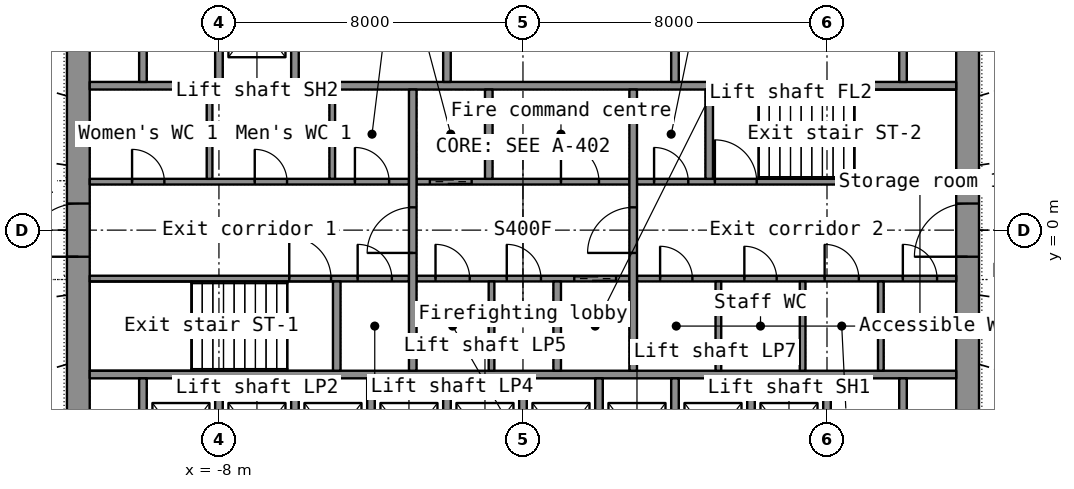
"""IFC4 building model, lengths in metres.
Left out: names, types, materials, properties, quantities, classifications, styles, units other than length and angle.
Written with IfcOpenShell. Run it as: python <this file> out.ifc"""

import sys

from ifc_helpers import new_model, si_unit, direction, frame, frame_2d, origin, place, context, subcontext, project, spatial, rectangle, extrude, element, fill, save


model = new_model("IFC4")
c1 = context("Model", 3, precision=1e-05, world=origin(), true_north=direction((0.0, 1.0)))
c2 = subcontext(c1, "Body", "Model", "MODEL_VIEW")
j1 = project(units=[si_unit("LENGTHUNIT", "METRE"), si_unit("PLANEANGLEUNIT", "RADIAN")], contexts=[c1])
p1 = place(None, origin())
s1 = spatial("IfcSite", under=j1, at=p1, CompositionType="ELEMENT")
p2 = place(p1, origin())
s2 = spatial("IfcBuilding", under=s1, at=p2, CompositionType="ELEMENT")
p3 = place(p2, origin())
s3 = spatial("IfcBuildingStorey", under=s2, at=p3, CompositionType="ELEMENT", Elevation=0.0)
p4 = place(p3, frame((-11.7, -7.2, 0.0), z_axis=(0.0, 0.0, 1.0), x_axis=(0.0, 1.0, 0.0)))
e1 = element("IfcWall", 1, at=p4, inside=s3, PredefinedType="SHEAR", context=c2, shape_type="SweptSolid", body=[
    extrude(rectangle(XDim=14.4, YDim=0.6, at=frame_2d((7.2, 0.0))), origin(), (0.0, 0.0, 1.0), 6.6),
])
p5 = place(p4, frame((6.5, 0.0, 0.0)))
e2 = element("IfcOpeningElement", 2, at=p5, cuts=e1, PredefinedType="OPENING", context=c2, shape_type="SweptSolid", body=[
    extrude(rectangle(XDim=1.4, YDim=2.2, at=frame_2d((0.7, 1.1))), frame((0.0, 0.31, 0.0), z_axis=(0.0, -1.0, 0.0), x_axis=(1.0, 0.0, 0.0)), (0.0, 0.0, 1.0), 0.62),
])
p6 = place(p3, frame((11.7, -7.2, 0.0), z_axis=(0.0, 0.0, 1.0), x_axis=(0.0, 1.0, 0.0)))
e3 = element("IfcWall", 3, at=p6, inside=s3, PredefinedType="SHEAR", context=c2, shape_type="SweptSolid", body=[
    extrude(rectangle(XDim=14.4, YDim=0.6, at=frame_2d((7.2, 0.0))), origin(), (0.0, 0.0, 1.0), 6.6),
])
p7 = place(p6, frame((6.5, 0.0, 0.0)))
e4 = element("IfcOpeningElement", 4, at=p7, cuts=e3, PredefinedType="OPENING", context=c2, shape_type="SweptSolid", body=[
    extrude(rectangle(XDim=1.4, YDim=2.2, at=frame_2d((0.7, 1.1))), frame((0.0, 0.31, 0.0), z_axis=(0.0, -1.0, 0.0), x_axis=(1.0, 0.0, 0.0)), (0.0, 0.0, 1.0), 0.62),
])
for number, where, z_axis, x_axis in (
    (5, (-11.4, -3.8, 0.0), (0.0, 0.0, 1.0), (1.0, 0.0, 0.0)),
    (6, (-11.4, 3.8, 0.0), (0.0, 0.0, 1.0), (1.0, 0.0, 0.0)),
):
    element("IfcWall", number, at=place(p3, frame(where, z_axis=z_axis, x_axis=x_axis)), inside=s3, PredefinedType="SHEAR", context=c2, shape_type="SweptSolid", body=[
        extrude(rectangle(XDim=22.8, YDim=0.2, at=frame_2d((11.4, 0.0))), origin(), (0.0, 0.0, 1.0), 6.6),
    ])
for number, where, z_axis, x_axis in (
    (7, (-10.0, -6.6, 0.0), (0.0, 0.0, 1.0), (0.0, 1.0, 0.0)),
    (8, (-8.0, -6.6, 0.0), (0.0, 0.0, 1.0), (0.0, 1.0, 0.0)),
    (9, (-6.0, -6.6, 0.0), (0.0, 0.0, 1.0), (0.0, 1.0, 0.0)),
    (10, (-4.0, -6.6, 0.0), (0.0, 0.0, 1.0), (0.0, 1.0, 0.0)),
    (11, (-2.0, -6.6, 0.0), (0.0, 0.0, 1.0), (0.0, 1.0, 0.0)),
    (12, (0.0, -6.6, 0.0), (0.0, 0.0, 1.0), (0.0, 1.0, 0.0)),
    (13, (2.0, -6.6, 0.0), (0.0, 0.0, 1.0), (0.0, 1.0, 0.0)),
    (14, (4.0, -6.6, 0.0), (0.0, 0.0, 1.0), (0.0, 1.0, 0.0)),
    (15, (6.0, -6.6, 0.0), (0.0, 0.0, 1.0), (0.0, 1.0, 0.0)),
    (16, (8.0, -6.6, 0.0), (0.0, 0.0, 1.0), (0.0, 1.0, 0.0)),
    (17, (10.0, -6.6, 0.0), (0.0, 0.0, 1.0), (0.0, 1.0, 0.0)),
    (18, (-10.0, 3.9, 0.0), (0.0, 0.0, 1.0), (0.0, 1.0, 0.0)),
    (19, (-8.0, 3.9, 0.0), (0.0, 0.0, 1.0), (0.0, 1.0, 0.0)),
    (20, (-6.0, 3.9, 0.0), (0.0, 0.0, 1.0), (0.0, 1.0, 0.0)),
    (21, (10.0, 3.9, 0.0), (0.0, 0.0, 1.0), (0.0, 1.0, 0.0)),
):
    element("IfcWall", number, at=place(p3, frame(where, z_axis=z_axis, x_axis=x_axis)), inside=s3, PredefinedType="SHEAR", context=c2, shape_type="SweptSolid", body=[
        extrude(rectangle(XDim=2.7, YDim=0.2, at=frame_2d((1.35, 0.0))), origin(), (0.0, 0.0, 1.0), 6.6),
    ])
for number, where, z_axis, x_axis in (
    (22, (-2.0, 3.9, 0.0), (0.0, 0.0, 1.0), (0.0, 1.0, 0.0)),
    (23, (4.0, 3.9, 0.0), (0.0, 0.0, 1.0), (0.0, 1.0, 0.0)),
):
    element("IfcWall", number, at=place(p3, frame(where, z_axis=z_axis, x_axis=x_axis)), inside=s3, PredefinedType="PARTITIONING", context=c2, shape_type="SweptSolid", body=[
        extrude(rectangle(XDim=2.7, YDim=0.2, at=frame_2d((1.35, 0.0))), origin(), (0.0, 0.0, 1.0), 6.6),
    ])
p8 = place(p3, frame((-11.4, -1.275, 0.0), z_axis=(0.0, 0.0, 1.0), x_axis=(1.0, 0.0, 0.0)))
e24 = element("IfcWall", 24, at=p8, inside=s3, PredefinedType="SHEAR", context=c2, shape_type="SweptSolid", body=[
    extrude(rectangle(XDim=8.4, YDim=0.15, at=frame_2d((4.2, 0.0))), origin(), (0.0, 0.0, 1.0), 6.6),
])
p9 = place(p8, frame((5.25, 0.0, 0.0)))
e25 = element("IfcOpeningElement", 25, at=p9, cuts=e24, PredefinedType="OPENING", context=c2, shape_type="SweptSolid", body=[
    extrude(rectangle(XDim=1.1, YDim=2.15, at=frame_2d((0.55, 1.075))), frame((0.0, 0.085, 0.0), z_axis=(0.0, -1.0, 0.0), x_axis=(1.0, 0.0, 0.0)), (0.0, 0.0, 1.0), 0.17),
])
p10 = place(p8, frame((7.05, 0.0, 0.0)))
e26 = element("IfcOpeningElement", 26, at=p10, cuts=e24, PredefinedType="OPENING", context=c2, shape_type="SweptSolid", body=[
    extrude(rectangle(XDim=0.9, YDim=2.1, at=frame_2d((0.45, 1.05))), frame((0.0, 0.085, 0.0), z_axis=(0.0, -1.0, 0.0), x_axis=(1.0, 0.0, 0.0)), (0.0, 0.0, 1.0), 0.17),
])
p11 = place(p3, frame((-2.8, -1.275, 0.0), z_axis=(0.0, 0.0, 1.0), x_axis=(1.0, 0.0, 0.0)))
e27 = element("IfcWall", 27, at=p11, inside=s3, PredefinedType="SHEAR", context=c2, shape_type="SweptSolid", body=[
    extrude(rectangle(XDim=5.6, YDim=0.15, at=frame_2d((2.8, 0.0))), origin(), (0.0, 0.0, 1.0), 6.6),
])
p12 = place(p11, frame((4.15, 0.0, 0.0)))
e28 = element("IfcOpeningElement", 28, at=p12, cuts=e27, PredefinedType="OPENING", context=c2, shape_type="SweptSolid", body=[
    extrude(rectangle(XDim=1.1, YDim=2.2, at=frame_2d((0.55, 1.1))), frame((0.0, 0.085, 0.0), z_axis=(0.0, -1.0, 0.0), x_axis=(1.0, 0.0, 0.0)), (0.0, 0.0, 1.0), 0.17),
])
p13 = place(p11, frame((0.499, 0.0, 0.0)))
e29 = element("IfcOpeningElement", 29, at=p13, cuts=e27, PredefinedType="OPENING", context=c2, shape_type="SweptSolid", body=[
    extrude(rectangle(XDim=0.9, YDim=2.1, at=frame_2d((0.45, 1.05))), frame((0.0, 0.085, 0.0), z_axis=(0.0, -1.0, 0.0), x_axis=(1.0, 0.0, 0.0)), (0.0, 0.0, 1.0), 0.17),
])
p14 = place(p11, frame((2.374, 0.0, 0.0)))
e30 = element("IfcOpeningElement", 30, at=p14, cuts=e27, PredefinedType="OPENING", context=c2, shape_type="SweptSolid", body=[
    extrude(rectangle(XDim=0.9, YDim=2.1, at=frame_2d((0.45, 1.05))), frame((0.0, 0.085, 0.0), z_axis=(0.0, -1.0, 0.0), x_axis=(1.0, 0.0, 0.0)), (0.0, 0.0, 1.0), 0.17),
])
p15 = place(p3, frame((3.0, -1.275, 0.0), z_axis=(0.0, 0.0, 1.0), x_axis=(1.0, 0.0, 0.0)))
e31 = element("IfcWall", 31, at=p15, inside=s3, PredefinedType="PARTITIONING", context=c2, shape_type="SweptSolid", body=[
    extrude(rectangle(XDim=8.4, YDim=0.15, at=frame_2d((4.2, 0.0))), origin(), (0.0, 0.0, 1.0), 6.6),
])
p16 = place(p15, frame((0.608, 0.0, 0.0)))
e32 = element("IfcOpeningElement", 32, at=p16, cuts=e31, PredefinedType="OPENING", context=c2, shape_type="SweptSolid", body=[
    extrude(rectangle(XDim=0.85, YDim=2.1, at=frame_2d((0.425, 1.05))), frame((0.0, 0.085, 0.0), z_axis=(0.0, -1.0, 0.0), x_axis=(1.0, 0.0, 0.0)), (0.0, 0.0, 1.0), 0.17),
])
p17 = place(p15, frame((2.825, 0.0, 0.0)))
e33 = element("IfcOpeningElement", 33, at=p17, cuts=e31, PredefinedType="OPENING", context=c2, shape_type="SweptSolid", body=[
    extrude(rectangle(XDim=0.85, YDim=2.1, at=frame_2d((0.425, 1.05))), frame((0.0, 0.085, 0.0), z_axis=(0.0, -1.0, 0.0), x_axis=(1.0, 0.0, 0.0)), (0.0, 0.0, 1.0), 0.17),
])
p18 = place(p15, frame((4.938, 0.0, 0.0)))
e34 = element("IfcOpeningElement", 34, at=p18, cuts=e31, PredefinedType="OPENING", context=c2, shape_type="SweptSolid", body=[
    extrude(rectangle(XDim=0.9, YDim=2.1, at=frame_2d((0.45, 1.05))), frame((0.0, 0.085, 0.0), z_axis=(0.0, -1.0, 0.0), x_axis=(1.0, 0.0, 0.0)), (0.0, 0.0, 1.0), 0.17),
])
p19 = place(p15, frame((6.996, 0.0, 0.0)))
e35 = element("IfcOpeningElement", 35, at=p19, cuts=e31, PredefinedType="OPENING", context=c2, shape_type="SweptSolid", body=[
    extrude(rectangle(XDim=0.9, YDim=2.1, at=frame_2d((0.45, 1.05))), frame((0.0, 0.085, 0.0), z_axis=(0.0, -1.0, 0.0), x_axis=(1.0, 0.0, 0.0)), (0.0, 0.0, 1.0), 0.17),
])
p20 = place(p3, frame((-11.4, 1.275, 0.0), z_axis=(0.0, 0.0, 1.0), x_axis=(1.0, 0.0, 0.0)))
e36 = element("IfcWall", 36, at=p20, inside=s3, PredefinedType="PARTITIONING", context=c2, shape_type="SweptSolid", body=[
    extrude(rectangle(XDim=8.4, YDim=0.15, at=frame_2d((4.2, 0.0))), origin(), (0.0, 0.0, 1.0), 6.6),
])
p21 = place(p20, frame((1.114, 0.0, 0.0)))
e37 = element("IfcOpeningElement", 37, at=p21, cuts=e36, PredefinedType="OPENING", context=c2, shape_type="SweptSolid", body=[
    extrude(rectangle(XDim=0.85, YDim=2.1, at=frame_2d((0.425, 1.05))), frame((0.0, 0.085, 0.0), z_axis=(0.0, -1.0, 0.0), x_axis=(1.0, 0.0, 0.0)), (0.0, 0.0, 1.0), 0.17),
])
p22 = place(p20, frame((4.342, 0.0, 0.0)))
e38 = element("IfcOpeningElement", 38, at=p22, cuts=e36, PredefinedType="OPENING", context=c2, shape_type="SweptSolid", body=[
    extrude(rectangle(XDim=0.85, YDim=2.1, at=frame_2d((0.425, 1.05))), frame((0.0, 0.085, 0.0), z_axis=(0.0, -1.0, 0.0), x_axis=(1.0, 0.0, 0.0)), (0.0, 0.0, 1.0), 0.17),
])
p23 = place(p20, frame((6.978, 0.0, 0.0)))
e39 = element("IfcOpeningElement", 39, at=p23, cuts=e36, PredefinedType="OPENING", context=c2, shape_type="SweptSolid", body=[
    extrude(rectangle(XDim=0.9, YDim=2.1, at=frame_2d((0.45, 1.05))), frame((0.0, 0.085, 0.0), z_axis=(0.0, -1.0, 0.0), x_axis=(1.0, 0.0, 0.0)), (0.0, 0.0, 1.0), 0.17),
])
p24 = place(p3, frame((-2.8, 1.275, 0.0), z_axis=(0.0, 0.0, 1.0), x_axis=(1.0, 0.0, 0.0)))
e40 = element("IfcWall", 40, at=p24, inside=s3, PredefinedType="SHEAR", context=c2, shape_type="SweptSolid", body=[
    extrude(rectangle(XDim=5.6, YDim=0.15, at=frame_2d((2.8, 0.0))), origin(), (0.0, 0.0, 1.0), 6.6),
])
p25 = place(p24, frame((0.35, 0.0, 0.0)))
e41 = element("IfcOpeningElement", 41, at=p25, cuts=e40, PredefinedType="OPENING", context=c2, shape_type="SweptSolid", body=[
    extrude(rectangle(XDim=1.1, YDim=2.2, at=frame_2d((0.55, 1.1))), frame((0.0, 0.085, 0.0), z_axis=(0.0, -1.0, 0.0), x_axis=(1.0, 0.0, 0.0)), (0.0, 0.0, 1.0), 0.17),
])
p26 = place(p24, frame((3.8, 0.0, 0.0)))
e42 = element("IfcOpeningElement", 42, at=p26, cuts=e40, PredefinedType="OPENING", context=c2, shape_type="SweptSolid", body=[
    extrude(rectangle(XDim=1.0, YDim=2.1, at=frame_2d((0.5, 1.05))), frame((0.0, 0.085, 0.0), z_axis=(0.0, -1.0, 0.0), x_axis=(1.0, 0.0, 0.0)), (0.0, 0.0, 1.0), 0.17),
])
p27 = place(p3, frame((3.0, 1.275, 0.0), z_axis=(0.0, 0.0, 1.0), x_axis=(1.0, 0.0, 0.0)))
e43 = element("IfcWall", 43, at=p27, inside=s3, PredefinedType="SHEAR", context=c2, shape_type="SweptSolid", body=[
    extrude(rectangle(XDim=8.4, YDim=0.15, at=frame_2d((4.2, 0.0))), origin(), (0.0, 0.0, 1.0), 6.6),
])
p28 = place(p27, frame((2.05, 0.0, 0.0)))
e44 = element("IfcOpeningElement", 44, at=p28, cuts=e43, PredefinedType="OPENING", context=c2, shape_type="SweptSolid", body=[
    extrude(rectangle(XDim=1.1, YDim=2.15, at=frame_2d((0.55, 1.075))), frame((0.0, 0.085, 0.0), z_axis=(0.0, -1.0, 0.0), x_axis=(1.0, 0.0, 0.0)), (0.0, 0.0, 1.0), 0.17),
])
p29 = place(p27, frame((0.45, 0.0, 0.0)))
e45 = element("IfcOpeningElement", 45, at=p29, cuts=e43, PredefinedType="OPENING", context=c2, shape_type="SweptSolid", body=[
    extrude(rectangle(XDim=0.9, YDim=2.1, at=frame_2d((0.45, 1.05))), frame((0.0, 0.085, 0.0), z_axis=(0.0, -1.0, 0.0), x_axis=(1.0, 0.0, 0.0)), (0.0, 0.0, 1.0), 0.17),
])
p30 = place(p3, frame((-2.9, -3.7, 0.0), z_axis=(0.0, 0.0, 1.0), x_axis=(0.0, 1.0, 0.0)))
e46 = element("IfcWall", 46, at=p30, inside=s3, PredefinedType="SHEAR", context=c2, shape_type="SweptSolid", body=[
    extrude(rectangle(XDim=7.4, YDim=0.2, at=frame_2d((3.7, 0.0))), origin(), (0.0, 0.0, 1.0), 6.6),
])
p31 = place(p30, frame((3.1, 0.0, 0.0)))
e47 = element("IfcOpeningElement", 47, at=p31, cuts=e46, PredefinedType="OPENING", context=c2, shape_type="SweptSolid", body=[
    extrude(rectangle(XDim=1.2, YDim=2.2, at=frame_2d((0.6, 1.1))), frame((0.0, 0.11, 0.0), z_axis=(0.0, -1.0, 0.0), x_axis=(1.0, 0.0, 0.0)), (0.0, 0.0, 1.0), 0.22),
])
p32 = place(p3, frame((2.9, -3.7, 0.0), z_axis=(0.0, 0.0, 1.0), x_axis=(0.0, 1.0, 0.0)))
e48 = element("IfcWall", 48, at=p32, inside=s3, PredefinedType="SHEAR", context=c2, shape_type="SweptSolid", body=[
    extrude(rectangle(XDim=7.4, YDim=0.2, at=frame_2d((3.7, 0.0))), origin(), (0.0, 0.0, 1.0), 6.6),
])
p33 = place(p32, frame((3.1, 0.0, 0.0)))
e49 = element("IfcOpeningElement", 49, at=p33, cuts=e48, PredefinedType="OPENING", context=c2, shape_type="SweptSolid", body=[
    extrude(rectangle(XDim=1.2, YDim=2.2, at=frame_2d((0.6, 1.1))), frame((0.0, 0.11, 0.0), z_axis=(0.0, -1.0, 0.0), x_axis=(1.0, 0.0, 0.0)), (0.0, 0.0, 1.0), 0.22),
])
for number, where, z_axis, x_axis in (
    (50, (-0.9, 1.35, 0.0), (0.0, 0.0, 1.0), (0.0, 1.0, 0.0)),
    (51, (0.9, -3.7, 0.0), (0.0, 0.0, 1.0), (0.0, 1.0, 0.0)),
    (52, (-4.9, -3.7, 0.0), (0.0, 0.0, 1.0), (0.0, 1.0, 0.0)),
    (53, (4.9, 1.35, 0.0), (0.0, 0.0, 1.0), (0.0, 1.0, 0.0)),
):
    element("IfcWall", number, at=place(p3, frame(where, z_axis=z_axis, x_axis=x_axis)), inside=s3, PredefinedType="SHEAR", context=c2, shape_type="SweptSolid", body=[
        extrude(rectangle(XDim=2.35, YDim=0.2, at=frame_2d((1.175, 0.0))), origin(), (0.0, 0.0, 1.0), 6.6),
    ])
for number, where, z_axis, x_axis in (
    (54, (-8.247, 1.35, 0.0), (0.0, 0.0, 1.0), (0.0, 1.0, 0.0)),
    (55, (-5.019, 1.35, 0.0), (0.0, 0.0, 1.0), (0.0, 1.0, 0.0)),
    (56, (5.142, -3.7, 0.0), (0.0, 0.0, 1.0), (0.0, 1.0, 0.0)),
    (57, (7.359, -3.7, 0.0), (0.0, 0.0, 1.0), (0.0, 1.0, 0.0)),
    (58, (9.417, -3.7, 0.0), (0.0, 0.0, 1.0), (0.0, 1.0, 0.0)),
    (59, (-0.827, -3.7, 0.0), (0.0, 0.0, 1.0), (0.0, 1.0, 0.0)),
):
    element("IfcWall", number, at=place(p3, frame(where, z_axis=z_axis, x_axis=x_axis)), inside=s3, PredefinedType="PARTITIONING", context=c2, shape_type="SweptSolid", body=[
        extrude(rectangle(XDim=2.35, YDim=0.15, at=frame_2d((1.175, 0.0))), origin(), (0.0, 0.0, 1.0), 6.6),
    ])
p34 = place(p5, origin())
e60 = element("IfcDoor", 60, at=p34, inside=s3, OperationType="DOUBLE_DOOR_SINGLE_SWING", PredefinedType="DOOR", context=c2, shape_type="SweptSolid", body=[
    extrude(rectangle(XDim=1.4, YDim=2.2, at=frame_2d((0.7, 1.1))), frame((0.0, 0.025, 0.0), z_axis=(0.0, -1.0, 0.0), x_axis=(1.0, 0.0, 0.0)), (0.0, 0.0, 1.0), 0.05),
])
fill(e2, e60)
p35 = place(p7, origin())
e61 = element("IfcDoor", 61, at=p35, inside=s3, OperationType="DOUBLE_DOOR_SINGLE_SWING", PredefinedType="DOOR", context=c2, shape_type="SweptSolid", body=[
    extrude(rectangle(XDim=1.4, YDim=2.2, at=frame_2d((0.7, 1.1))), frame((0.0, 0.025, 0.0), z_axis=(0.0, -1.0, 0.0), x_axis=(1.0, 0.0, 0.0)), (0.0, 0.0, 1.0), 0.05),
])
fill(e4, e61)
p36 = place(p31, origin())
e62 = element("IfcDoor", 62, at=p36, inside=s3, OperationType="SINGLE_SWING_LEFT", PredefinedType="DOOR", context=c2, shape_type="SweptSolid", body=[
    extrude(rectangle(XDim=1.2, YDim=2.2, at=frame_2d((0.6, 1.1))), frame((0.0, 0.025, 0.0), z_axis=(0.0, -1.0, 0.0), x_axis=(1.0, 0.0, 0.0)), (0.0, 0.0, 1.0), 0.05),
])
fill(e47, e62)
p37 = place(p33, origin())
e63 = element("IfcDoor", 63, at=p37, inside=s3, OperationType="SINGLE_SWING_LEFT", PredefinedType="DOOR", context=c2, shape_type="SweptSolid", body=[
    extrude(rectangle(XDim=1.2, YDim=2.2, at=frame_2d((0.6, 1.1))), frame((0.0, 0.025, 0.0), z_axis=(0.0, -1.0, 0.0), x_axis=(1.0, 0.0, 0.0)), (0.0, 0.0, 1.0), 0.05),
])
fill(e49, e63)
p38 = place(p25, origin())
e64 = element("IfcDoor", 64, at=p38, inside=s3, OperationType="DOUBLE_DOOR_SLIDING", PredefinedType="DOOR", context=c2, shape_type="SweptSolid", body=[
    extrude(rectangle(XDim=1.1, YDim=2.2, at=frame_2d((0.55, 1.1))), frame((0.0, 0.025, 0.0), z_axis=(0.0, -1.0, 0.0), x_axis=(1.0, 0.0, 0.0)), (0.0, 0.0, 1.0), 0.05),
])
fill(e41, e64)
p39 = place(p12, origin())
e65 = element("IfcDoor", 65, at=p39, inside=s3, OperationType="DOUBLE_DOOR_SLIDING", PredefinedType="DOOR", context=c2, shape_type="SweptSolid", body=[
    extrude(rectangle(XDim=1.1, YDim=2.2, at=frame_2d((0.55, 1.1))), frame((0.0, 0.025, 0.0), z_axis=(0.0, -1.0, 0.0), x_axis=(1.0, 0.0, 0.0)), (0.0, 0.0, 1.0), 0.05),
])
fill(e28, e65)
p40 = place(p9, origin())
e66 = element("IfcDoor", 66, at=p40, inside=s3, OperationType="SINGLE_SWING_LEFT", PredefinedType="DOOR", context=c2, shape_type="SweptSolid", body=[
    extrude(rectangle(XDim=1.1, YDim=2.15, at=frame_2d((0.55, 1.075))), frame((0.0, 0.025, 0.0), z_axis=(0.0, -1.0, 0.0), x_axis=(1.0, 0.0, 0.0)), (0.0, 0.0, 1.0), 0.05),
])
fill(e25, e66)
p41 = place(p28, origin())
e67 = element("IfcDoor", 67, at=p41, inside=s3, OperationType="SINGLE_SWING_LEFT", PredefinedType="DOOR", context=c2, shape_type="SweptSolid", body=[
    extrude(rectangle(XDim=1.1, YDim=2.15, at=frame_2d((0.55, 1.075))), frame((0.0, 0.025, 0.0), z_axis=(0.0, -1.0, 0.0), x_axis=(1.0, 0.0, 0.0)), (0.0, 0.0, 1.0), 0.05),
])
fill(e44, e67)
p42 = place(p21, origin())
e68 = element("IfcDoor", 68, at=p42, inside=s3, OperationType="SINGLE_SWING_LEFT", PredefinedType="DOOR", context=c2, shape_type="SweptSolid", body=[
    extrude(rectangle(XDim=0.85, YDim=2.1, at=frame_2d((0.425, 1.05))), frame((0.0, 0.025, 0.0), z_axis=(0.0, -1.0, 0.0), x_axis=(1.0, 0.0, 0.0)), (0.0, 0.0, 1.0), 0.05),
])
fill(e37, e68)
p43 = place(p22, origin())
e69 = element("IfcDoor", 69, at=p43, inside=s3, OperationType="SINGLE_SWING_LEFT", PredefinedType="DOOR", context=c2, shape_type="SweptSolid", body=[
    extrude(rectangle(XDim=0.85, YDim=2.1, at=frame_2d((0.425, 1.05))), frame((0.0, 0.025, 0.0), z_axis=(0.0, -1.0, 0.0), x_axis=(1.0, 0.0, 0.0)), (0.0, 0.0, 1.0), 0.05),
])
fill(e38, e69)
p44 = place(p23, origin())
e70 = element("IfcDoor", 70, at=p44, inside=s3, OperationType="SINGLE_SWING_LEFT", PredefinedType="DOOR", context=c2, shape_type="SweptSolid", body=[
    extrude(rectangle(XDim=0.9, YDim=2.1, at=frame_2d((0.45, 1.05))), frame((0.0, 0.025, 0.0), z_axis=(0.0, -1.0, 0.0), x_axis=(1.0, 0.0, 0.0)), (0.0, 0.0, 1.0), 0.05),
])
fill(e39, e70)
p45 = place(p16, origin())
e71 = element("IfcDoor", 71, at=p45, inside=s3, OperationType="SINGLE_SWING_LEFT", PredefinedType="DOOR", context=c2, shape_type="SweptSolid", body=[
    extrude(rectangle(XDim=0.85, YDim=2.1, at=frame_2d((0.425, 1.05))), frame((0.0, 0.025, 0.0), z_axis=(0.0, -1.0, 0.0), x_axis=(1.0, 0.0, 0.0)), (0.0, 0.0, 1.0), 0.05),
])
fill(e32, e71)
p46 = place(p17, origin())
e72 = element("IfcDoor", 72, at=p46, inside=s3, OperationType="SINGLE_SWING_LEFT", PredefinedType="DOOR", context=c2, shape_type="SweptSolid", body=[
    extrude(rectangle(XDim=0.85, YDim=2.1, at=frame_2d((0.425, 1.05))), frame((0.0, 0.025, 0.0), z_axis=(0.0, -1.0, 0.0), x_axis=(1.0, 0.0, 0.0)), (0.0, 0.0, 1.0), 0.05),
])
fill(e33, e72)
p47 = place(p18, origin())
e73 = element("IfcDoor", 73, at=p47, inside=s3, OperationType="SINGLE_SWING_LEFT", PredefinedType="DOOR", context=c2, shape_type="SweptSolid", body=[
    extrude(rectangle(XDim=0.9, YDim=2.1, at=frame_2d((0.45, 1.05))), frame((0.0, 0.025, 0.0), z_axis=(0.0, -1.0, 0.0), x_axis=(1.0, 0.0, 0.0)), (0.0, 0.0, 1.0), 0.05),
])
fill(e34, e73)
p48 = place(p19, origin())
e74 = element("IfcDoor", 74, at=p48, inside=s3, OperationType="SINGLE_SWING_LEFT", PredefinedType="DOOR", context=c2, shape_type="SweptSolid", body=[
    extrude(rectangle(XDim=0.9, YDim=2.1, at=frame_2d((0.45, 1.05))), frame((0.0, 0.025, 0.0), z_axis=(0.0, -1.0, 0.0), x_axis=(1.0, 0.0, 0.0)), (0.0, 0.0, 1.0), 0.05),
])
fill(e35, e74)
p49 = place(p26, origin())
e75 = element("IfcDoor", 75, at=p49, inside=s3, OperationType="SINGLE_SWING_LEFT", PredefinedType="DOOR", context=c2, shape_type="SweptSolid", body=[
    extrude(rectangle(XDim=1.0, YDim=2.1, at=frame_2d((0.5, 1.05))), frame((0.0, 0.025, 0.0), z_axis=(0.0, -1.0, 0.0), x_axis=(1.0, 0.0, 0.0)), (0.0, 0.0, 1.0), 0.05),
])
fill(e42, e75)
p50 = place(p13, origin())
e76 = element("IfcDoor", 76, at=p50, inside=s3, OperationType="SINGLE_SWING_LEFT", PredefinedType="DOOR", context=c2, shape_type="SweptSolid", body=[
    extrude(rectangle(XDim=0.9, YDim=2.1, at=frame_2d((0.45, 1.05))), frame((0.0, 0.025, 0.0), z_axis=(0.0, -1.0, 0.0), x_axis=(1.0, 0.0, 0.0)), (0.0, 0.0, 1.0), 0.05),
])
fill(e29, e76)
p51 = place(p14, origin())
e77 = element("IfcDoor", 77, at=p51, inside=s3, OperationType="SINGLE_SWING_LEFT", PredefinedType="DOOR", context=c2, shape_type="SweptSolid", body=[
    extrude(rectangle(XDim=0.9, YDim=2.1, at=frame_2d((0.45, 1.05))), frame((0.0, 0.025, 0.0), z_axis=(0.0, -1.0, 0.0), x_axis=(1.0, 0.0, 0.0)), (0.0, 0.0, 1.0), 0.05),
])
fill(e30, e77)
p52 = place(p29, origin())
e78 = element("IfcDoor", 78, at=p52, inside=s3, OperationType="SINGLE_SWING_LEFT", PredefinedType="DOOR", context=c2, shape_type="SweptSolid", body=[
    extrude(rectangle(XDim=0.9, YDim=2.1, at=frame_2d((0.45, 1.05))), frame((0.0, 0.025, 0.0), z_axis=(0.0, -1.0, 0.0), x_axis=(1.0, 0.0, 0.0)), (0.0, 0.0, 1.0), 0.05),
])
fill(e45, e78)
p53 = place(p10, origin())
e79 = element("IfcDoor", 79, at=p53, inside=s3, OperationType="SINGLE_SWING_LEFT", PredefinedType="DOOR", context=c2, shape_type="SweptSolid", body=[
    extrude(rectangle(XDim=0.9, YDim=2.1, at=frame_2d((0.45, 1.05))), frame((0.0, 0.025, 0.0), z_axis=(0.0, -1.0, 0.0), x_axis=(1.0, 0.0, 0.0)), (0.0, 0.0, 1.0), 0.05),
])
fill(e26, e79)
save(model, sys.argv[1])
